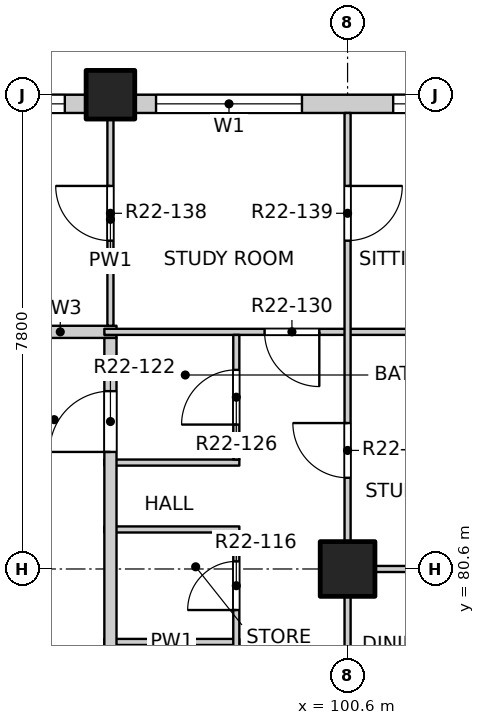
"""IFC4 building model, lengths in metres.
Left out: names, types, materials, properties, quantities, classifications, styles, units other than length and angle.
Written with IfcOpenShell. Run it as: python <this file> out.ifc"""

import sys

from ifc_helpers import new_model, si_unit, direction, frame, frame_2d, origin, origin_2d, place, context, subcontext, project, spatial, rectangle, extrude, element, fill, save


model = new_model("IFC4")
c1 = context("Model", 3, precision=1e-05, world=origin(), true_north=direction((0.0, 1.0)))
c2 = subcontext(c1, "Body", "Model", "MODEL_VIEW")
j1 = project(units=[si_unit("LENGTHUNIT", "METRE"), si_unit("PLANEANGLEUNIT", "RADIAN")], contexts=[c1])
p1 = place(None, origin())
s1 = spatial("IfcSite", under=j1, at=p1, CompositionType="ELEMENT")
p2 = place(p1, origin())
s2 = spatial("IfcBuilding", under=s1, at=p2, CompositionType="ELEMENT")
p3 = place(p2, frame((0.0, 0.0, 224.5)))
s3 = spatial("IfcBuildingStorey", under=s2, at=p3, CompositionType="ELEMENT", Elevation=224.5)
p4 = place(p3, frame((96.7, 88.4, -0.25), z_axis=(0.0, 0.0, 1.0), x_axis=(1.0, 0.0, 0.0)))
e1 = element("IfcColumn", 1, at=p4, inside=s3, PredefinedType="COLUMN", context=c2, shape_type="SweptSolid", body=[
    extrude(rectangle(XDim=0.8, YDim=0.8, at=origin_2d()), origin(), (0.0, 0.0, 1.0), 3.4),
])
p5 = place(p3, frame((100.6, 80.6, -0.25), z_axis=(0.0, 0.0, 1.0), x_axis=(1.0, 0.0, 0.0)))
e2 = element("IfcColumn", 2, at=p5, inside=s3, PredefinedType="COLUMN", context=c2, shape_type="SweptSolid", body=[
    extrude(rectangle(XDim=0.9, YDim=0.9, at=origin_2d()), origin(), (0.0, 0.0, 1.0), 3.4),
])
p6 = place(p3, frame((73.7, 88.25, 0.0), z_axis=(0.0, 0.0, 1.0), x_axis=(1.0, 0.0, 0.0)))
e3 = element("IfcWall", 3, at=p6, inside=s3, PredefinedType="SOLIDWALL", context=c2, shape_type="SweptSolid", body=[
    extrude(rectangle(XDim=22.6, YDim=0.3, at=frame_2d((11.3, 0.0))), origin(), (0.0, 0.0, 1.0), 2.7),
])
p7 = place(p6, frame((0.35, 0.0, 0.9)))
e4 = element("IfcOpeningElement", 4, at=p7, cuts=e3, PredefinedType="OPENING", context=c2, shape_type="SweptSolid", body=[
    extrude(rectangle(XDim=2.4, YDim=1.8, at=frame_2d((1.2, 0.9))), frame((0.0, 0.16, 0.0), z_axis=(0.0, -1.0, 0.0), x_axis=(1.0, 0.0, 0.0)), (0.0, 0.0, 1.0), 0.32),
])
p8 = place(p6, frame((4.25, 0.0, 0.9)))
e5 = element("IfcOpeningElement", 5, at=p8, cuts=e3, PredefinedType="OPENING", context=c2, shape_type="SweptSolid", body=[
    extrude(rectangle(XDim=2.4, YDim=1.8, at=frame_2d((1.2, 0.9))), frame((0.0, 0.16, 0.0), z_axis=(0.0, -1.0, 0.0), x_axis=(1.0, 0.0, 0.0)), (0.0, 0.0, 1.0), 0.32),
])
p9 = place(p6, frame((8.15, 0.0, 0.9)))
e6 = element("IfcOpeningElement", 6, at=p9, cuts=e3, PredefinedType="OPENING", context=c2, shape_type="SweptSolid", body=[
    extrude(rectangle(XDim=2.4, YDim=1.8, at=frame_2d((1.2, 0.9))), frame((0.0, 0.16, 0.0), z_axis=(0.0, -1.0, 0.0), x_axis=(1.0, 0.0, 0.0)), (0.0, 0.0, 1.0), 0.32),
])
p10 = place(p6, frame((12.05, 0.0, 0.9)))
e7 = element("IfcOpeningElement", 7, at=p10, cuts=e3, PredefinedType="OPENING", context=c2, shape_type="SweptSolid", body=[
    extrude(rectangle(XDim=2.4, YDim=1.8, at=frame_2d((1.2, 0.9))), frame((0.0, 0.16, 0.0), z_axis=(0.0, -1.0, 0.0), x_axis=(1.0, 0.0, 0.0)), (0.0, 0.0, 1.0), 0.32),
])
p11 = place(p6, frame((15.95, 0.0, 0.9)))
e8 = element("IfcOpeningElement", 8, at=p11, cuts=e3, PredefinedType="OPENING", context=c2, shape_type="SweptSolid", body=[
    extrude(rectangle(XDim=2.4, YDim=1.8, at=frame_2d((1.2, 0.9))), frame((0.0, 0.16, 0.0), z_axis=(0.0, -1.0, 0.0), x_axis=(1.0, 0.0, 0.0)), (0.0, 0.0, 1.0), 0.32),
])
p12 = place(p6, frame((19.85, 0.0, 0.9)))
e9 = element("IfcOpeningElement", 9, at=p12, cuts=e3, PredefinedType="OPENING", context=c2, shape_type="SweptSolid", body=[
    extrude(rectangle(XDim=2.4, YDim=1.8, at=frame_2d((1.2, 0.9))), frame((0.0, 0.16, 0.0), z_axis=(0.0, -1.0, 0.0), x_axis=(1.0, 0.0, 0.0)), (0.0, 0.0, 1.0), 0.32),
])
p13 = place(p3, frame((97.1, 88.25, 0.0), z_axis=(0.0, 0.0, 1.0), x_axis=(1.0, 0.0, 0.0)))
e10 = element("IfcWall", 10, at=p13, inside=s3, PredefinedType="SOLIDWALL", context=c2, shape_type="SweptSolid", body=[
    extrude(rectangle(XDim=7.4, YDim=0.3, at=frame_2d((3.7, 0.0))), origin(), (0.0, 0.0, 1.0), 2.7),
])
p14 = place(p13, frame((0.35, 0.0, 0.9)))
e11 = element("IfcOpeningElement", 11, at=p14, cuts=e10, PredefinedType="OPENING", context=c2, shape_type="SweptSolid", body=[
    extrude(rectangle(XDim=2.4, YDim=1.8, at=frame_2d((1.2, 0.9))), frame((0.0, 0.16, 0.0), z_axis=(0.0, -1.0, 0.0), x_axis=(1.0, 0.0, 0.0)), (0.0, 0.0, 1.0), 0.32),
])
p15 = place(p13, frame((4.25, 0.0, 0.9)))
e12 = element("IfcOpeningElement", 12, at=p15, cuts=e10, PredefinedType="OPENING", context=c2, shape_type="SweptSolid", body=[
    extrude(rectangle(XDim=2.4, YDim=1.8, at=frame_2d((1.2, 0.9))), frame((0.0, 0.16, 0.0), z_axis=(0.0, -1.0, 0.0), x_axis=(1.0, 0.0, 0.0)), (0.0, 0.0, 1.0), 0.32),
])
p16 = place(p3, frame((96.6, 79.4, 0.0), z_axis=(0.0, 0.0, 1.0), x_axis=(1.0, 0.0, 0.0)))
e13 = element("IfcWall", 13, at=p16, inside=s3, PredefinedType="PARTITIONING", context=c2, shape_type="SweptSolid", body=[
    extrude(rectangle(XDim=2.22, YDim=0.1, at=frame_2d((1.11, 0.0))), origin(), (0.0, 0.0, 1.0), 3.15),
])
p17 = place(p3, frame((100.55, 80.6, 0.0), z_axis=(0.0, 0.0, 1.0), x_axis=(1.0, 0.0, 0.0)))
e14 = element("IfcWall", 14, at=p17, inside=s3, PredefinedType="PARTITIONING", context=c2, shape_type="SweptSolid", body=[
    extrude(rectangle(XDim=7.55, YDim=0.1, at=frame_2d((3.775, 0.0))), origin(), (0.0, 0.0, 1.0), 3.15),
])
for number, where, z_axis, x_axis in (
    (15, (96.6, 81.25, 0.0), (0.0, 0.0, 1.0), (1.0, 0.0, 0.0)),
    (16, (96.6, 82.35, 0.0), (0.0, 0.0, 1.0), (1.0, 0.0, 0.0)),
):
    element("IfcWall", number, at=place(p3, frame(where, z_axis=z_axis, x_axis=x_axis)), inside=s3, PredefinedType="PARTITIONING", context=c2, shape_type="SweptSolid", body=[
        extrude(rectangle(XDim=2.22, YDim=0.1, at=frame_2d((1.11, 0.0))), origin(), (0.0, 0.0, 1.0), 3.15),
    ])
p18 = place(p3, frame((94.95, 84.5, 0.0), z_axis=(0.0, 0.0, 1.0), x_axis=(1.0, 0.0, 0.0)))
e17 = element("IfcWall", 17, at=p18, inside=s3, PredefinedType="PARTITIONING", context=c2, shape_type="SweptSolid", body=[
    extrude(rectangle(XDim=1.85, YDim=0.2, at=frame_2d((0.925, 0.0))), origin(), (0.0, 0.0, 1.0), 3.15),
])
p19 = place(p3, frame((96.6, 84.5, 0.0), z_axis=(0.0, 0.0, 1.0), x_axis=(1.0, 0.0, 0.0)))
e18 = element("IfcWall", 18, at=p19, inside=s3, PredefinedType="PARTITIONING", context=c2, shape_type="SweptSolid", body=[
    extrude(rectangle(XDim=11.5, YDim=0.1, at=frame_2d((5.75, 0.0))), origin(), (0.0, 0.0, 1.0), 3.15),
])
p20 = place(p19, frame((2.635, 0.0, 0.0)))
e19 = element("IfcOpeningElement", 19, at=p20, cuts=e18, PredefinedType="OPENING", context=c2, shape_type="SweptSolid", body=[
    extrude(rectangle(XDim=0.9, YDim=2.1, at=frame_2d((0.45, 1.05))), frame((0.0, 0.06, 0.0), z_axis=(0.0, -1.0, 0.0), x_axis=(1.0, 0.0, 0.0)), (0.0, 0.0, 1.0), 0.12),
])
p21 = place(p3, frame((96.7, 49.5, 0.0), z_axis=(0.0, 0.0, 1.0), x_axis=(0.0, 1.0, 0.0)))
e20 = element("IfcWall", 20, at=p21, inside=s3, PredefinedType="PARTITIONING", context=c2, shape_type="SweptSolid", body=[
    extrude(rectangle(XDim=34.9, YDim=0.2, at=frame_2d((17.45, 0.0))), origin(), (0.0, 0.0, 1.0), 3.15),
])
p22 = place(p21, frame((9.675, 0.0, 0.0)))
e21 = element("IfcOpeningElement", 21, at=p22, cuts=e20, PredefinedType="OPENING", context=c2, shape_type="SweptSolid", body=[
    extrude(rectangle(XDim=1.0, YDim=2.1, at=frame_2d((0.5, 1.05))), frame((0.0, 0.11, 0.0), z_axis=(0.0, -1.0, 0.0), x_axis=(1.0, 0.0, 0.0)), (0.0, 0.0, 1.0), 0.22),
])
p23 = place(p21, frame((22.925, 0.0, 0.0)))
e22 = element("IfcOpeningElement", 22, at=p23, cuts=e20, PredefinedType="OPENING", context=c2, shape_type="SweptSolid", body=[
    extrude(rectangle(XDim=1.0, YDim=2.1, at=frame_2d((0.5, 1.05))), frame((0.0, 0.11, 0.0), z_axis=(0.0, -1.0, 0.0), x_axis=(1.0, 0.0, 0.0)), (0.0, 0.0, 1.0), 0.22),
])
p24 = place(p21, frame((33.025, 0.0, 0.0)))
e23 = element("IfcOpeningElement", 23, at=p24, cuts=e20, PredefinedType="OPENING", context=c2, shape_type="SweptSolid", body=[
    extrude(rectangle(XDim=1.0, YDim=2.1, at=frame_2d((0.5, 1.05))), frame((0.0, 0.11, 0.0), z_axis=(0.0, -1.0, 0.0), x_axis=(1.0, 0.0, 0.0)), (0.0, 0.0, 1.0), 0.22),
])
p25 = place(p3, frame((96.7, 84.6, 0.0), z_axis=(0.0, 0.0, 1.0), x_axis=(0.0, 1.0, 0.0)))
e24 = element("IfcWall", 24, at=p25, inside=s3, PredefinedType="PARTITIONING", context=c2, shape_type="SweptSolid", body=[
    extrude(rectangle(XDim=3.5, YDim=0.1, at=frame_2d((1.75, 0.0))), origin(), (0.0, 0.0, 1.0), 3.15),
])
p26 = place(p25, frame((1.4, 0.0, 0.0)))
e25 = element("IfcOpeningElement", 25, at=p26, cuts=e24, PredefinedType="OPENING", context=c2, shape_type="SweptSolid", body=[
    extrude(rectangle(XDim=0.9, YDim=2.1, at=frame_2d((0.45, 1.05))), frame((0.0, 0.06, 0.0), z_axis=(0.0, -1.0, 0.0), x_axis=(1.0, 0.0, 0.0)), (0.0, 0.0, 1.0), 0.12),
])
p27 = place(p3, frame((98.77, 72.3, 0.0), z_axis=(0.0, 0.0, 1.0), x_axis=(0.0, 1.0, 0.0)))
e26 = element("IfcWall", 26, at=p27, inside=s3, PredefinedType="PARTITIONING", context=c2, shape_type="SweptSolid", body=[
    extrude(rectangle(XDim=8.9, YDim=0.1, at=frame_2d((4.45, 0.0))), origin(), (0.0, 0.0, 1.0), 3.15),
])
p28 = place(p27, frame((0.54, 0.0, 0.0)))
e27 = element("IfcOpeningElement", 27, at=p28, cuts=e26, PredefinedType="OPENING", context=c2, shape_type="SweptSolid", body=[
    extrude(rectangle(XDim=0.8, YDim=2.1, at=frame_2d((0.4, 1.05))), frame((0.0, 0.06, 0.0), z_axis=(0.0, -1.0, 0.0), x_axis=(1.0, 0.0, 0.0)), (0.0, 0.0, 1.0), 0.12),
])
p29 = place(p27, frame((2.715, 0.0, 0.0)))
e28 = element("IfcOpeningElement", 28, at=p29, cuts=e26, PredefinedType="OPENING", context=c2, shape_type="SweptSolid", body=[
    extrude(rectangle(XDim=0.9, YDim=2.1, at=frame_2d((0.45, 1.05))), frame((0.0, 0.06, 0.0), z_axis=(0.0, -1.0, 0.0), x_axis=(1.0, 0.0, 0.0)), (0.0, 0.0, 1.0), 0.12),
])
p30 = place(p27, frame((5.3, 0.0, 0.0)))
e29 = element("IfcOpeningElement", 29, at=p30, cuts=e26, PredefinedType="OPENING", context=c2, shape_type="SweptSolid", body=[
    extrude(rectangle(XDim=0.9, YDim=2.1, at=frame_2d((0.45, 1.05))), frame((0.0, 0.06, 0.0), z_axis=(0.0, -1.0, 0.0), x_axis=(1.0, 0.0, 0.0)), (0.0, 0.0, 1.0), 0.12),
])
p31 = place(p27, frame((7.625, 0.0, 0.0)))
e30 = element("IfcOpeningElement", 30, at=p31, cuts=e26, PredefinedType="OPENING", context=c2, shape_type="SweptSolid", body=[
    extrude(rectangle(XDim=0.8, YDim=2.1, at=frame_2d((0.4, 1.05))), frame((0.0, 0.06, 0.0), z_axis=(0.0, -1.0, 0.0), x_axis=(1.0, 0.0, 0.0)), (0.0, 0.0, 1.0), 0.12),
])
p32 = place(p3, frame((98.77, 82.4, 0.0), z_axis=(0.0, 0.0, 1.0), x_axis=(0.0, 1.0, 0.0)))
e31 = element("IfcWall", 31, at=p32, inside=s3, PredefinedType="PARTITIONING", context=c2, shape_type="SweptSolid", body=[
    extrude(rectangle(XDim=2.05, YDim=0.1, at=frame_2d((1.025, 0.0))), origin(), (0.0, 0.0, 1.0), 3.15),
])
p33 = place(p32, frame((0.575, 0.0, 0.0)))
e32 = element("IfcOpeningElement", 32, at=p33, cuts=e31, PredefinedType="OPENING", context=c2, shape_type="SweptSolid", body=[
    extrude(rectangle(XDim=0.9, YDim=2.1, at=frame_2d((0.45, 1.05))), frame((0.0, 0.06, 0.0), z_axis=(0.0, -1.0, 0.0), x_axis=(1.0, 0.0, 0.0)), (0.0, 0.0, 1.0), 0.12),
])
p34 = place(p3, frame((100.6, 41.9, 0.0), z_axis=(0.0, 0.0, 1.0), x_axis=(0.0, 1.0, 0.0)))
e33 = element("IfcWall", 33, at=p34, inside=s3, PredefinedType="PARTITIONING", context=c2, shape_type="SweptSolid", body=[
    extrude(rectangle(XDim=46.2, YDim=0.1, at=frame_2d((23.1, 0.0))), origin(), (0.0, 0.0, 1.0), 3.15),
])
p35 = place(p34, frame((1.2, 0.0, 0.0)))
e34 = element("IfcOpeningElement", 34, at=p35, cuts=e33, PredefinedType="OPENING", context=c2, shape_type="SweptSolid", body=[
    extrude(rectangle(XDim=0.9, YDim=2.1, at=frame_2d((0.45, 1.05))), frame((0.0, 0.06, 0.0), z_axis=(0.0, -1.0, 0.0), x_axis=(1.0, 0.0, 0.0)), (0.0, 0.0, 1.0), 0.12),
])
p36 = place(p34, frame((6.025, 0.0, 0.0)))
e35 = element("IfcOpeningElement", 35, at=p36, cuts=e33, PredefinedType="OPENING", context=c2, shape_type="SweptSolid", body=[
    extrude(rectangle(XDim=0.9, YDim=2.1, at=frame_2d((0.45, 1.05))), frame((0.0, 0.06, 0.0), z_axis=(0.0, -1.0, 0.0), x_axis=(1.0, 0.0, 0.0)), (0.0, 0.0, 1.0), 0.12),
])
p37 = place(p34, frame((9.0, 0.0, 0.0)))
e36 = element("IfcOpeningElement", 36, at=p37, cuts=e33, PredefinedType="OPENING", context=c2, shape_type="SweptSolid", body=[
    extrude(rectangle(XDim=0.9, YDim=2.1, at=frame_2d((0.45, 1.05))), frame((0.0, 0.06, 0.0), z_axis=(0.0, -1.0, 0.0), x_axis=(1.0, 0.0, 0.0)), (0.0, 0.0, 1.0), 0.12),
])
p38 = place(p34, frame((12.9, 0.0, 0.0)))
e37 = element("IfcOpeningElement", 37, at=p38, cuts=e33, PredefinedType="OPENING", context=c2, shape_type="SweptSolid", body=[
    extrude(rectangle(XDim=0.9, YDim=2.1, at=frame_2d((0.45, 1.05))), frame((0.0, 0.06, 0.0), z_axis=(0.0, -1.0, 0.0), x_axis=(1.0, 0.0, 0.0)), (0.0, 0.0, 1.0), 0.12),
])
p39 = place(p34, frame((17.775, 0.0, 0.0)))
e38 = element("IfcOpeningElement", 38, at=p39, cuts=e33, PredefinedType="OPENING", context=c2, shape_type="SweptSolid", body=[
    extrude(rectangle(XDim=0.9, YDim=2.1, at=frame_2d((0.45, 1.05))), frame((0.0, 0.06, 0.0), z_axis=(0.0, -1.0, 0.0), x_axis=(1.0, 0.0, 0.0)), (0.0, 0.0, 1.0), 0.12),
])
p40 = place(p34, frame((21.625, 0.0, 0.0)))
e39 = element("IfcOpeningElement", 39, at=p40, cuts=e33, PredefinedType="OPENING", context=c2, shape_type="SweptSolid", body=[
    extrude(rectangle(XDim=0.9, YDim=2.1, at=frame_2d((0.45, 1.05))), frame((0.0, 0.06, 0.0), z_axis=(0.0, -1.0, 0.0), x_axis=(1.0, 0.0, 0.0)), (0.0, 0.0, 1.0), 0.12),
])
p41 = place(p34, frame((25.575, 0.0, 0.0)))
e40 = element("IfcOpeningElement", 40, at=p41, cuts=e33, PredefinedType="OPENING", context=c2, shape_type="SweptSolid", body=[
    extrude(rectangle(XDim=0.9, YDim=2.1, at=frame_2d((0.45, 1.05))), frame((0.0, 0.06, 0.0), z_axis=(0.0, -1.0, 0.0), x_axis=(1.0, 0.0, 0.0)), (0.0, 0.0, 1.0), 0.12),
])
p42 = place(p34, frame((28.5, 0.0, 0.0)))
e41 = element("IfcOpeningElement", 41, at=p42, cuts=e33, PredefinedType="OPENING", context=c2, shape_type="SweptSolid", body=[
    extrude(rectangle(XDim=0.9, YDim=2.1, at=frame_2d((0.45, 1.05))), frame((0.0, 0.06, 0.0), z_axis=(0.0, -1.0, 0.0), x_axis=(1.0, 0.0, 0.0)), (0.0, 0.0, 1.0), 0.12),
])
p43 = place(p34, frame((33.375, 0.0, 0.0)))
e42 = element("IfcOpeningElement", 42, at=p43, cuts=e33, PredefinedType="OPENING", context=c2, shape_type="SweptSolid", body=[
    extrude(rectangle(XDim=0.9, YDim=2.1, at=frame_2d((0.45, 1.05))), frame((0.0, 0.06, 0.0), z_axis=(0.0, -1.0, 0.0), x_axis=(1.0, 0.0, 0.0)), (0.0, 0.0, 1.0), 0.12),
])
p44 = place(p34, frame((36.3, 0.0, 0.0)))
e43 = element("IfcOpeningElement", 43, at=p44, cuts=e33, PredefinedType="OPENING", context=c2, shape_type="SweptSolid", body=[
    extrude(rectangle(XDim=0.9, YDim=2.1, at=frame_2d((0.45, 1.05))), frame((0.0, 0.06, 0.0), z_axis=(0.0, -1.0, 0.0), x_axis=(1.0, 0.0, 0.0)), (0.0, 0.0, 1.0), 0.12),
])
p45 = place(p34, frame((40.2, 0.0, 0.0)))
e44 = element("IfcOpeningElement", 44, at=p45, cuts=e33, PredefinedType="OPENING", context=c2, shape_type="SweptSolid", body=[
    extrude(rectangle(XDim=0.9, YDim=2.1, at=frame_2d((0.45, 1.05))), frame((0.0, 0.06, 0.0), z_axis=(0.0, -1.0, 0.0), x_axis=(1.0, 0.0, 0.0)), (0.0, 0.0, 1.0), 0.12),
])
p46 = place(p34, frame((44.1, 0.0, 0.0)))
e45 = element("IfcOpeningElement", 45, at=p46, cuts=e33, PredefinedType="OPENING", context=c2, shape_type="SweptSolid", body=[
    extrude(rectangle(XDim=0.9, YDim=2.1, at=frame_2d((0.45, 1.05))), frame((0.0, 0.06, 0.0), z_axis=(0.0, -1.0, 0.0), x_axis=(1.0, 0.0, 0.0)), (0.0, 0.0, 1.0), 0.12),
])
p47 = place(p12, origin())
e46 = element("IfcWindow", 46, at=p47, inside=s3, PartitioningType="DOUBLE_PANEL_VERTICAL", PredefinedType="WINDOW", context=c2, shape_type="SweptSolid", body=[
    extrude(rectangle(XDim=2.4, YDim=1.8, at=frame_2d((1.2, 0.9))), frame((0.0, 0.03, 0.0), z_axis=(0.0, -1.0, 0.0), x_axis=(1.0, 0.0, 0.0)), (0.0, 0.0, 1.0), 0.06),
])
fill(e9, e46)
p48 = place(p14, origin())
e47 = element("IfcWindow", 47, at=p48, inside=s3, PartitioningType="DOUBLE_PANEL_VERTICAL", PredefinedType="WINDOW", context=c2, shape_type="SweptSolid", body=[
    extrude(rectangle(XDim=2.4, YDim=1.8, at=frame_2d((1.2, 0.9))), frame((0.0, 0.03, 0.0), z_axis=(0.0, -1.0, 0.0), x_axis=(1.0, 0.0, 0.0)), (0.0, 0.0, 1.0), 0.06),
])
fill(e11, e47)
p49 = place(p15, origin())
e48 = element("IfcWindow", 48, at=p49, inside=s3, PartitioningType="DOUBLE_PANEL_VERTICAL", PredefinedType="WINDOW", context=c2, shape_type="SweptSolid", body=[
    extrude(rectangle(XDim=2.4, YDim=1.8, at=frame_2d((1.2, 0.9))), frame((0.0, 0.03, 0.0), z_axis=(0.0, -1.0, 0.0), x_axis=(1.0, 0.0, 0.0)), (0.0, 0.0, 1.0), 0.06),
])
fill(e12, e48)
p50 = place(p31, origin())
e49 = element("IfcDoor", 49, at=p50, inside=s3, OperationType="SINGLE_SWING_LEFT", PredefinedType="DOOR", context=c2, shape_type="SweptSolid", body=[
    extrude(rectangle(XDim=0.8, YDim=2.1, at=frame_2d((0.4, 1.05))), frame((0.0, 0.025, 0.0), z_axis=(0.0, -1.0, 0.0), x_axis=(1.0, 0.0, 0.0)), (0.0, 0.0, 1.0), 0.05),
])
fill(e30, e49)
p51 = place(p45, origin())
e50 = element("IfcDoor", 50, at=p51, inside=s3, OperationType="SINGLE_SWING_RIGHT", PredefinedType="DOOR", context=c2, shape_type="SweptSolid", body=[
    extrude(rectangle(XDim=0.9, YDim=2.1, at=frame_2d((0.45, 1.05))), frame((0.0, 0.025, 0.0), z_axis=(0.0, -1.0, 0.0), x_axis=(1.0, 0.0, 0.0)), (0.0, 0.0, 1.0), 0.05),
])
fill(e44, e50)
p52 = place(p24, origin())
e51 = element("IfcDoor", 51, at=p52, inside=s3, OperationType="SINGLE_SWING_LEFT", PredefinedType="DOOR", context=c2, shape_type="SweptSolid", body=[
    extrude(rectangle(XDim=1.0, YDim=2.1, at=frame_2d((0.5, 1.05))), frame((0.0, 0.025, 0.0), z_axis=(0.0, -1.0, 0.0), x_axis=(1.0, 0.0, 0.0)), (0.0, 0.0, 1.0), 0.05),
])
fill(e23, e51)
p53 = place(p33, origin())
e52 = element("IfcDoor", 52, at=p53, inside=s3, OperationType="SINGLE_SWING_LEFT", PredefinedType="DOOR", context=c2, shape_type="SweptSolid", body=[
    extrude(rectangle(XDim=0.9, YDim=2.1, at=frame_2d((0.45, 1.05))), frame((0.0, 0.025, 0.0), z_axis=(0.0, -1.0, 0.0), x_axis=(1.0, 0.0, 0.0)), (0.0, 0.0, 1.0), 0.05),
])
fill(e32, e52)
p54 = place(p20, origin())
e53 = element("IfcDoor", 53, at=p54, inside=s3, OperationType="SINGLE_SWING_LEFT", PredefinedType="DOOR", context=c2, shape_type="SweptSolid", body=[
    extrude(rectangle(XDim=0.9, YDim=2.1, at=frame_2d((0.45, 1.05))), frame((0.0, 0.025, 0.0), z_axis=(0.0, -1.0, 0.0), x_axis=(1.0, 0.0, 0.0)), (0.0, 0.0, 1.0), 0.05),
])
fill(e19, e53)
p55 = place(p26, origin())
e54 = element("IfcDoor", 54, at=p55, inside=s3, OperationType="SINGLE_SWING_RIGHT", PredefinedType="DOOR", context=c2, shape_type="SweptSolid", body=[
    extrude(rectangle(XDim=0.9, YDim=2.1, at=frame_2d((0.45, 1.05))), frame((0.0, 0.025, 0.0), z_axis=(0.0, -1.0, 0.0), x_axis=(1.0, 0.0, 0.0)), (0.0, 0.0, 1.0), 0.05),
])
fill(e25, e54)
p56 = place(p46, origin())
e55 = element("IfcDoor", 55, at=p56, inside=s3, OperationType="SINGLE_SWING_LEFT", PredefinedType="DOOR", context=c2, shape_type="SweptSolid", body=[
    extrude(rectangle(XDim=0.9, YDim=2.1, at=frame_2d((0.45, 1.05))), frame((0.0, 0.025, 0.0), z_axis=(0.0, -1.0, 0.0), x_axis=(1.0, 0.0, 0.0)), (0.0, 0.0, 1.0), 0.05),
])
fill(e45, e55)
save(model, sys.argv[1])
